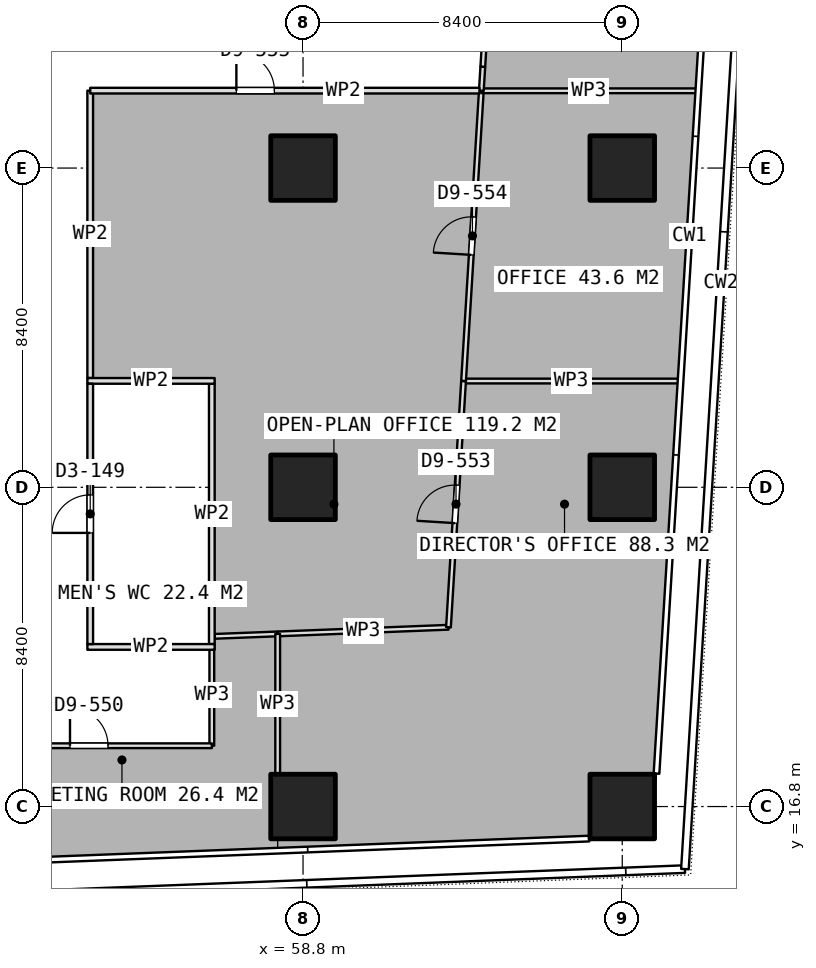
"""IFC4 building model, lengths in metres.
Left out: names, types, materials, properties, quantities, classifications, styles, units other than length and angle.
Written with IfcOpenShell. Run it as: python <this file> out.ifc"""

import sys

from ifc_helpers import new_model, si_unit, direction, frame, frame_2d, origin, origin_2d, place, context, subcontext, project, spatial, rectangle, extrude, element, fill, save


model = new_model("IFC4")
c1 = context("Model", 3, precision=1e-05, world=origin(), true_north=direction((0.0, 1.0)))
c2 = subcontext(c1, "Body", "Model", "MODEL_VIEW")
j1 = project(units=[si_unit("LENGTHUNIT", "METRE"), si_unit("PLANEANGLEUNIT", "RADIAN")], contexts=[c1])
p1 = place(None, origin())
s1 = spatial("IfcSite", under=j1, at=p1, CompositionType="ELEMENT")
p2 = place(p1, origin())
s2 = spatial("IfcBuilding", under=s1, at=p2, CompositionType="ELEMENT")
p3 = place(p2, frame((0.0, 0.0, 140.3)))
s3 = spatial("IfcBuildingStorey", under=s2, at=p3, CompositionType="ELEMENT", Elevation=140.3)
for number, where, z_axis, x_axis in (
    (1, (58.8, 16.8, 0.0), (0.0, 0.0, 1.0), (1.0, 0.0, 0.0)),
    (2, (58.8, 25.2, 0.0), (0.0, 0.0, 1.0), (1.0, 0.0, 0.0)),
    (3, (58.8, 33.6, 0.0), (0.0, 0.0, 1.0), (1.0, 0.0, 0.0)),
    (4, (67.2, 16.8, 0.0), (0.0, 0.0, 1.0), (1.0, 0.0, 0.0)),
    (5, (67.2, 25.2, 0.0), (0.0, 0.0, 1.0), (1.0, 0.0, 0.0)),
    (6, (67.2, 33.6, 0.0), (0.0, 0.0, 1.0), (1.0, 0.0, 0.0)),
):
    element("IfcColumn", number, at=place(p3, frame(where, z_axis=z_axis, x_axis=x_axis)), inside=s3, PredefinedType="COLUMN", context=c2, shape_type="SweptSolid", body=[
        extrude(rectangle(XDim=1.7, YDim=1.7, at=origin_2d()), origin(), (0.0, 0.0, 1.0), 3.75),
    ])
for number, where, z_axis, x_axis in (
    (7, (53.125, 21.0, 0.0), (0.0, 0.0, 1.0), (1.0, 0.0, 0.0)),
    (8, (53.125, 28.0, 0.0), (0.0, 0.0, 1.0), (1.0, 0.0, 0.0)),
):
    element("IfcWall", number, at=place(p3, frame(where, z_axis=z_axis, x_axis=x_axis)), inside=s3, PredefinedType="PARTITIONING", context=c2, shape_type="SweptSolid", body=[
        extrude(rectangle(XDim=3.35, YDim=0.15, at=frame_2d((1.675, 0.0))), origin(), (0.0, 0.0, 1.0), 3.5),
    ])
p4 = place(p3, frame((53.2, 21.075, 0.0), z_axis=(0.0, 0.0, 1.0), x_axis=(0.0, 1.0, 0.0)))
e9 = element("IfcWall", 9, at=p4, inside=s3, PredefinedType="PARTITIONING", context=c2, shape_type="SweptSolid", body=[
    extrude(rectangle(XDim=6.85, YDim=0.15, at=frame_2d((3.425, 0.0))), origin(), (0.0, 0.0, 1.0), 3.5),
])
p5 = place(p4, frame((2.925, 0.0, 0.0)))
e10 = element("IfcOpeningElement", 10, at=p5, cuts=e9, PredefinedType="OPENING", context=c2, shape_type="SweptSolid", body=[
    extrude(rectangle(XDim=1.0, YDim=2.1, at=frame_2d((0.5, 1.05))), frame((0.0, 0.085, 0.0), z_axis=(0.0, -1.0, 0.0), x_axis=(1.0, 0.0, 0.0)), (0.0, 0.0, 1.0), 0.17),
])
p6 = place(p3, frame((56.4, 21.075, 0.0), z_axis=(0.0, 0.0, 1.0), x_axis=(0.0, 1.0, 0.0)))
e11 = element("IfcWall", 11, at=p6, inside=s3, PredefinedType="PARTITIONING", context=c2, shape_type="SweptSolid", body=[
    extrude(rectangle(XDim=6.85, YDim=0.15, at=frame_2d((3.425, 0.0))), origin(), (0.0, 0.0, 1.0), 3.5),
])
p7 = place(p3, frame((56.475, 21.278, 0.0), z_axis=(0.0, 0.0, 1.0), x_axis=(0.999256603287, 0.038551793559, 0.0)))
e12 = element("IfcWall", 12, at=p7, inside=s3, PredefinedType="PARTITIONING", context=c2, shape_type="SweptSolid", body=[
    extrude(rectangle(XDim=1.659, YDim=0.125, at=frame_2d((0.83, 0.0))), origin(), (0.0, 0.0, 1.0), 3.5),
])
p8 = place(p3, frame((58.133, 21.342, 0.0), z_axis=(0.0, 0.0, 1.0), x_axis=(0.0, -1.0, 0.0)))
e13 = element("IfcWall", 13, at=p8, inside=s3, PredefinedType="PARTITIONING", context=c2, shape_type="SweptSolid", body=[
    extrude(rectangle(XDim=3.672, YDim=0.125, at=frame_2d((1.836, 0.0))), origin(), (0.0, 0.0, 1.0), 3.5),
])
p9 = place(p3, frame((49.937, 18.4, 0.0), z_axis=(0.0, 0.0, 1.0), x_axis=(1.0, 0.0, 0.0)))
e14 = element("IfcWall", 14, at=p9, inside=s3, PredefinedType="PARTITIONING", context=c2, shape_type="SweptSolid", body=[
    extrude(rectangle(XDim=6.463, YDim=0.125, at=frame_2d((3.231, 0.0))), origin(), (0.0, 0.0, 1.0), 3.5),
])
p10 = place(p9, frame((2.731, 0.0, 0.0)))
e15 = element("IfcOpeningElement", 15, at=p10, cuts=e14, PredefinedType="OPENING", context=c2, shape_type="SweptSolid", body=[
    extrude(rectangle(XDim=1.0, YDim=2.1, at=frame_2d((0.5, 1.05))), frame((0.0, 0.073, 0.0), z_axis=(0.0, -1.0, 0.0), x_axis=(1.0, 0.0, 0.0)), (0.0, 0.0, 1.0), 0.145),
])
p11 = place(p3, frame((56.4, 18.4, 0.0), z_axis=(0.0, 0.0, 1.0), x_axis=(0.0, 1.0, 0.0)))
e16 = element("IfcWall", 16, at=p11, inside=s3, PredefinedType="PARTITIONING", context=c2, shape_type="SweptSolid", body=[
    extrude(rectangle(XDim=2.674, YDim=0.125, at=frame_2d((1.337, 0.0))), origin(), (0.0, 0.0, 1.0), 3.5),
])
p12 = place(p3, frame((63.024, 27.996, 0.0), z_axis=(0.0, 0.0, 1.0), x_axis=(1.0, 0.0, 0.0)))
e17 = element("IfcWall", 17, at=p12, inside=s3, PredefinedType="PARTITIONING", context=c2, shape_type="SweptSolid", body=[
    extrude(rectangle(XDim=5.66, YDim=0.125, at=frame_2d((2.83, 0.0))), origin(), (0.0, 0.0, 1.0), 3.5),
])
p13 = place(p3, frame((58.134, 21.342, 0.0), z_axis=(0.0, 0.0, 1.0), x_axis=(0.999241881709, 0.038931501885, 0.0)))
e18 = element("IfcWall", 18, at=p13, inside=s3, PredefinedType="PARTITIONING", context=c2, shape_type="SweptSolid", body=[
    extrude(rectangle(XDim=4.496, YDim=0.125, at=frame_2d((2.248, 0.0))), origin(), (0.0, 0.0, 1.0), 3.5),
])
p14 = place(p3, frame((62.627, 21.517, 0.0), z_axis=(0.0, 0.0, 1.0), x_axis=(0.061155945859, 0.998128223369, 0.0)))
e19 = element("IfcWall", 19, at=p14, inside=s3, PredefinedType="PARTITIONING", context=c2, shape_type="SweptSolid", body=[
    extrude(rectangle(XDim=6.491, YDim=0.125, at=frame_2d((3.246, 0.0))), origin(), (0.0, 0.0, 1.0), 3.5),
])
p15 = place(p14, frame((2.746, 0.0, 0.0)))
e20 = element("IfcOpeningElement", 20, at=p15, cuts=e19, PredefinedType="OPENING", context=c2, shape_type="SweptSolid", body=[
    extrude(rectangle(XDim=1.0, YDim=2.1, at=frame_2d((0.5, 1.05))), frame((0.0, 0.073, 0.0), z_axis=(0.0, -1.0, 0.0), x_axis=(1.0, 0.0, 0.0)), (0.0, 0.0, 1.0), 0.145),
])
p16 = place(p3, frame((63.024, 27.997, 0.0), z_axis=(0.0, 0.0, 1.0), x_axis=(0.061176245149, 0.998126979412, 0.0)))
e21 = element("IfcWall", 21, at=p16, inside=s3, PredefinedType="PARTITIONING", context=c2, shape_type="SweptSolid", body=[
    extrude(rectangle(XDim=7.65, YDim=0.125, at=frame_2d((3.825, 0.0))), origin(), (0.0, 0.0, 1.0), 3.5),
])
p17 = place(p16, frame((3.325, 0.0, 0.0)))
e22 = element("IfcOpeningElement", 22, at=p17, cuts=e21, PredefinedType="OPENING", context=c2, shape_type="SweptSolid", body=[
    extrude(rectangle(XDim=1.0, YDim=2.1, at=frame_2d((0.5, 1.05))), frame((0.0, 0.073, 0.0), z_axis=(0.0, -1.0, 0.0), x_axis=(1.0, 0.0, 0.0)), (0.0, 0.0, 1.0), 0.145),
])
p18 = place(p3, frame((63.492, 35.633, 0.0), z_axis=(0.0, 0.0, 1.0), x_axis=(1.0, 0.0, 0.0)))
e23 = element("IfcWall", 23, at=p18, inside=s3, PredefinedType="PARTITIONING", context=c2, shape_type="SweptSolid", body=[
    extrude(rectangle(XDim=5.66, YDim=0.125, at=frame_2d((2.83, 0.0))), origin(), (0.0, 0.0, 1.0), 3.5),
])
p19 = place(p3, frame((63.492, 35.634, 0.0), z_axis=(0.0, 0.0, 1.0), x_axis=(0.061682245647, 0.998095837368, 0.0)))
e24 = element("IfcWall", 24, at=p19, inside=s3, PredefinedType="PARTITIONING", context=c2, shape_type="SweptSolid", body=[
    extrude(rectangle(XDim=0.633, YDim=0.125, at=frame_2d((0.317, 0.0))), origin(), (0.0, 0.0, 1.0), 3.5),
])
p20 = place(p3, frame((63.531, 36.266, 0.0), z_axis=(0.0, 0.0, 1.0), x_axis=(0.060564181147, 0.998164305093, 0.0)))
e25 = element("IfcWall", 25, at=p20, inside=s3, PredefinedType="PARTITIONING", context=c2, shape_type="SweptSolid", body=[
    extrude(rectangle(XDim=1.173, YDim=0.125, at=frame_2d((0.586, 0.0))), origin(), (0.0, 0.0, 1.0), 3.5),
])
p21 = place(p3, frame((53.2, 28.075, 0.0), z_axis=(0.0, 0.0, 1.0), x_axis=(0.0, 1.0, 0.0)))
e26 = element("IfcWall", 26, at=p21, inside=s3, PredefinedType="PARTITIONING", context=c2, shape_type="SweptSolid", body=[
    extrude(rectangle(XDim=7.562, YDim=0.15, at=frame_2d((3.781, 0.0))), origin(), (0.0, 0.0, 1.0), 3.5),
])
p22 = place(p3, frame((53.2, 35.637, 0.0), z_axis=(0.0, 0.0, 1.0), x_axis=(1.0, 0.0, 0.0)))
e27 = element("IfcWall", 27, at=p22, inside=s3, PredefinedType="PARTITIONING", context=c2, shape_type="SweptSolid", body=[
    extrude(rectangle(XDim=10.243, YDim=0.15, at=frame_2d((5.122, 0.0))), origin(), (0.0, 0.0, 1.0), 3.5),
])
p23 = place(p22, frame((3.846, 0.0, 0.0)))
e28 = element("IfcOpeningElement", 28, at=p23, cuts=e27, PredefinedType="OPENING", context=c2, shape_type="SweptSolid", body=[
    extrude(rectangle(XDim=1.0, YDim=2.1, at=frame_2d((0.5, 1.05))), frame((0.0, 0.085, 0.0), z_axis=(0.0, -1.0, 0.0), x_axis=(1.0, 0.0, 0.0)), (0.0, 0.0, 1.0), 0.17),
])
p24 = place(p5, origin())
e29 = element("IfcDoor", 29, at=p24, inside=s3, OperationType="SINGLE_SWING_LEFT", PredefinedType="DOOR", context=c2, shape_type="SweptSolid", body=[
    extrude(rectangle(XDim=1.0, YDim=2.1, at=frame_2d((0.5, 1.05))), frame((0.0, 0.025, 0.0), z_axis=(0.0, -1.0, 0.0), x_axis=(1.0, 0.0, 0.0)), (0.0, 0.0, 1.0), 0.05),
])
fill(e10, e29)
p25 = place(p10, origin())
e30 = element("IfcDoor", 30, at=p25, inside=s3, OperationType="SINGLE_SWING_LEFT", PredefinedType="DOOR", context=c2, shape_type="SweptSolid", body=[
    extrude(rectangle(XDim=1.0, YDim=2.1, at=frame_2d((0.5, 1.05))), frame((0.0, 0.025, 0.0), z_axis=(0.0, -1.0, 0.0), x_axis=(1.0, 0.0, 0.0)), (0.0, 0.0, 1.0), 0.05),
])
fill(e15, e30)
p26 = place(p15, origin())
e31 = element("IfcDoor", 31, at=p26, inside=s3, OperationType="SINGLE_SWING_LEFT", PredefinedType="DOOR", context=c2, shape_type="SweptSolid", body=[
    extrude(rectangle(XDim=1.0, YDim=2.1, at=frame_2d((0.5, 1.05))), frame((0.0, 0.025, 0.0), z_axis=(0.0, -1.0, 0.0), x_axis=(1.0, 0.0, 0.0)), (0.0, 0.0, 1.0), 0.05),
])
fill(e20, e31)
p27 = place(p17, origin())
e32 = element("IfcDoor", 32, at=p27, inside=s3, OperationType="SINGLE_SWING_LEFT", PredefinedType="DOOR", context=c2, shape_type="SweptSolid", body=[
    extrude(rectangle(XDim=1.0, YDim=2.1, at=frame_2d((0.5, 1.05))), frame((0.0, 0.025, 0.0), z_axis=(0.0, -1.0, 0.0), x_axis=(1.0, 0.0, 0.0)), (0.0, 0.0, 1.0), 0.05),
])
fill(e22, e32)
p28 = place(p23, origin())
e33 = element("IfcDoor", 33, at=p28, inside=s3, OperationType="SINGLE_SWING_LEFT", PredefinedType="DOOR", context=c2, shape_type="SweptSolid", body=[
    extrude(rectangle(XDim=1.0, YDim=2.1, at=frame_2d((0.5, 1.05))), frame((0.0, 0.025, 0.0), z_axis=(0.0, -1.0, 0.0), x_axis=(1.0, 0.0, 0.0)), (0.0, 0.0, 1.0), 0.05),
])
fill(e28, e33)
save(model, sys.argv[1])
